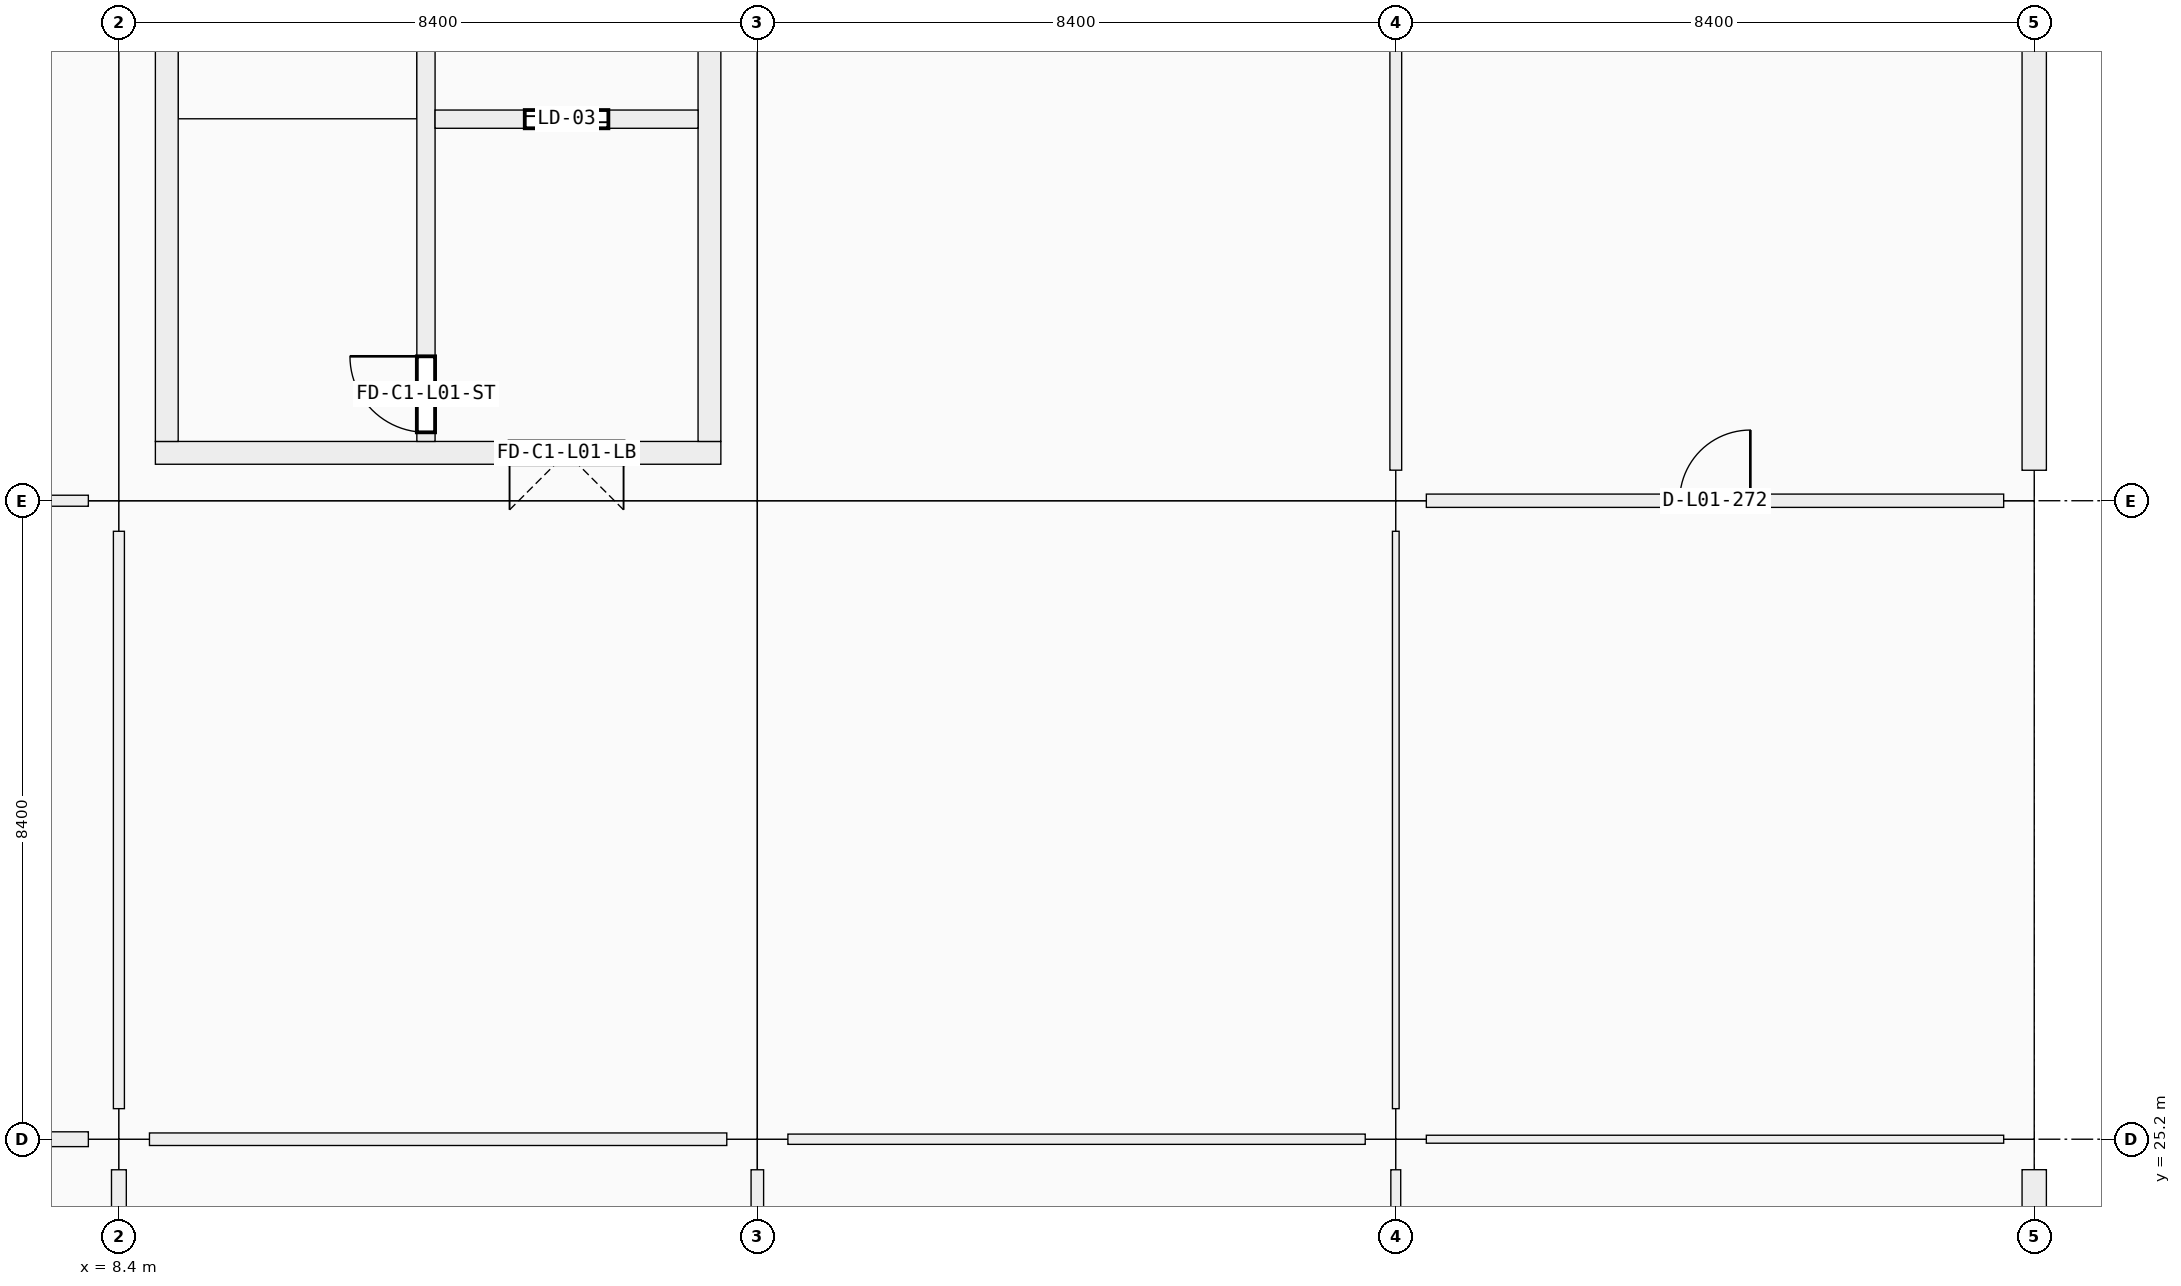
"""IFC4 building model, lengths in metres.
Left out: names, types, materials, properties, quantities, classifications, styles, units other than length and angle.
Written with IfcOpenShell. Run it as: python <this file> out.ifc"""

import sys

from ifc_helpers import new_model, si_unit, direction, frame, frame_2d, origin, origin_2d, place, context, subcontext, project, spatial, rectangle, extrude, element, fill, save


model = new_model("IFC4")
c1 = context("Model", 3, precision=1e-05, world=origin(), true_north=direction((0.0, 1.0)))
c2 = subcontext(c1, "Body", "Model", "MODEL_VIEW")
j1 = project(units=[si_unit("LENGTHUNIT", "METRE"), si_unit("PLANEANGLEUNIT", "RADIAN")], contexts=[c1])
p1 = place(None, origin())
s1 = spatial("IfcSite", under=j1, at=p1, CompositionType="ELEMENT")
p2 = place(p1, origin())
s2 = spatial("IfcBuilding", under=s1, at=p2, CompositionType="ELEMENT")
p3 = place(p2, frame((0.0, 0.0, 5.76)))
s3 = spatial("IfcBuildingStorey", under=s2, at=p3, CompositionType="ELEMENT", Elevation=5.76)
for number, where, z_axis, x_axis in (
    (1, (8.4, 25.2, 0.0), (0.0, 0.0, 1.0), (1.0, 0.0, 0.0)),
    (2, (8.4, 33.6, 0.0), (0.0, 0.0, 1.0), (1.0, 0.0, 0.0)),
    (3, (16.8, 25.2, 0.0), (0.0, 0.0, 1.0), (1.0, 0.0, 0.0)),
    (4, (16.8, 33.6, 0.0), (0.0, 0.0, 1.0), (1.0, 0.0, 0.0)),
    (5, (25.2, 25.2, 0.0), (0.0, 0.0, 1.0), (1.0, 0.0, 0.0)),
    (6, (25.2, 33.6, 0.0), (0.0, 0.0, 1.0), (1.0, 0.0, 0.0)),
    (7, (33.6, 25.2, 0.0), (0.0, 0.0, 1.0), (1.0, 0.0, 0.0)),
    (8, (33.6, 33.6, 0.0), (0.0, 0.0, 1.0), (1.0, 0.0, 0.0)),
):
    element("IfcColumn", number, at=place(p3, frame(where, z_axis=z_axis, x_axis=x_axis)), inside=s3, PredefinedType="COLUMN", context=c2, shape_type="SweptSolid", body=[
        extrude(rectangle(XDim=0.8, YDim=0.8, at=origin_2d()), origin(), (0.0, 0.0, 1.0), 4.5),
    ])
p4 = place(p3, frame((33.6, 24.799, 0.0), z_axis=(0.0, 0.0, 1.0), x_axis=(0.0, -1.0, 0.0)))
e9 = element("IfcWall", 9, at=p4, inside=s3, PredefinedType="SOLIDWALL", context=c2, shape_type="SweptSolid", body=[
    extrude(rectangle(XDim=7.598, YDim=0.32, at=frame_2d((3.799, 0.0))), origin(), (0.0, 0.0, 1.0), 3.4),
])
p5 = place(p4, frame((2.349, 0.0, 0.9)))
e10 = element("IfcOpeningElement", 10, at=p5, cuts=e9, PredefinedType="OPENING", context=c2, shape_type="SweptSolid", body=[
    extrude(rectangle(XDim=2.9, YDim=1.85, at=frame_2d((1.45, 0.925))), frame((0.0, 0.16, 0.0), z_axis=(0.0, -1.0, 0.0), x_axis=(1.0, 0.0, 0.0)), (0.0, 0.0, 1.0), 0.32),
])
p6 = place(p3, frame((33.6, 41.599, 0.0), z_axis=(0.0, 0.0, 1.0), x_axis=(0.0, -1.0, 0.0)))
e11 = element("IfcWall", 11, at=p6, inside=s3, PredefinedType="SOLIDWALL", context=c2, shape_type="SweptSolid", body=[
    extrude(rectangle(XDim=7.598, YDim=0.32, at=frame_2d((3.799, 0.0))), origin(), (0.0, 0.0, 1.0), 3.4),
])
p7 = place(p6, frame((3.074, 0.0, 0.9)))
e12 = element("IfcOpeningElement", 12, at=p7, cuts=e11, PredefinedType="OPENING", context=c2, shape_type="SweptSolid", body=[
    extrude(rectangle(XDim=1.45, YDim=1.85, at=frame_2d((0.725, 0.925))), frame((0.0, 0.16, 0.0), z_axis=(0.0, -1.0, 0.0), x_axis=(1.0, 0.0, 0.0)), (0.0, 0.0, 1.0), 0.32),
])
p8 = place(p3, frame((16.32, 34.23, 0.0), z_axis=(0.0, 0.0, 1.0), x_axis=(-1.0, 0.0, 0.0)))
e13 = element("IfcWall", 13, at=p8, inside=s3, PredefinedType="SHEAR", context=c2, shape_type="SweptSolid", body=[
    extrude(rectangle(XDim=7.44, YDim=0.3, at=frame_2d((3.72, 0.0))), origin(), (0.0, 0.0, 1.0), 4.5),
])
p9 = place(p8, frame((1.28, 0.0, 0.0)))
e14 = element("IfcOpeningElement", 14, at=p9, cuts=e13, PredefinedType="OPENING", context=c2, shape_type="SweptSolid", body=[
    extrude(rectangle(XDim=1.5, YDim=2.15, at=frame_2d((0.75, 1.075))), frame((0.0, 0.15, 0.0), z_axis=(0.0, -1.0, 0.0), x_axis=(1.0, 0.0, 0.0)), (0.0, 0.0, 1.0), 0.3),
])
for number, where, z_axis, x_axis in (
    (15, (9.03, 34.38, 0.0), (0.0, 0.0, 1.0), (0.0, 1.0, 0.0)),
    (16, (16.17, 41.22, 0.0), (0.0, 0.0, 1.0), (0.0, -1.0, 0.0)),
):
    element("IfcWall", number, at=place(p3, frame(where, z_axis=z_axis, x_axis=x_axis)), inside=s3, PredefinedType="SHEAR", context=c2, shape_type="SweptSolid", body=[
        extrude(rectangle(XDim=6.84, YDim=0.3, at=frame_2d((3.42, 0.0))), origin(), (0.0, 0.0, 1.0), 4.5),
    ])
p10 = place(p3, frame((12.44, 34.38, 0.0), z_axis=(0.0, 0.0, 1.0), x_axis=(0.0, 1.0, 0.0)))
e17 = element("IfcWall", 17, at=p10, inside=s3, PredefinedType="SHEAR", context=c2, shape_type="SweptSolid", body=[
    extrude(rectangle(XDim=6.84, YDim=0.24, at=frame_2d((3.42, 0.0))), origin(), (0.0, 0.0, 1.0), 4.5),
])
p11 = place(p10, frame((0.12, 0.0, 0.0)))
e18 = element("IfcOpeningElement", 18, at=p11, cuts=e17, PredefinedType="OPENING", context=c2, shape_type="SweptSolid", body=[
    extrude(rectangle(XDim=1.0, YDim=2.15, at=frame_2d((0.5, 1.075))), frame((0.0, 0.12, 0.0), z_axis=(0.0, -1.0, 0.0), x_axis=(1.0, 0.0, 0.0)), (0.0, 0.0, 1.0), 0.24),
])
p12 = place(p3, frame((12.56, 38.62, 0.0), z_axis=(0.0, 0.0, 1.0), x_axis=(1.0, 0.0, 0.0)))
e19 = element("IfcWall", 19, at=p12, inside=s3, PredefinedType="SHEAR", context=c2, shape_type="SweptSolid", body=[
    extrude(rectangle(XDim=3.46, YDim=0.24, at=frame_2d((1.73, 0.0))), origin(), (0.0, 0.0, 1.0), 4.5),
])
p13 = place(p12, frame((1.18, 0.0, 0.0)))
e20 = element("IfcOpeningElement", 20, at=p13, cuts=e19, PredefinedType="OPENING", context=c2, shape_type="SweptSolid", body=[
    extrude(rectangle(XDim=1.1, YDim=2.15, at=frame_2d((0.55, 1.075))), frame((0.0, 0.12, 0.0), z_axis=(0.0, -1.0, 0.0), x_axis=(1.0, 0.0, 0.0)), (0.0, 0.0, 1.0), 0.24),
])
p14 = place(p3, frame((0.277, 25.2, 0.0), z_axis=(0.0, 0.0, 1.0), x_axis=(1.0, 0.0, 0.0)))
e21 = element("IfcWall", 21, at=p14, inside=s3, PredefinedType="PARTITIONING", context=c2, shape_type="SweptSolid", body=[
    extrude(rectangle(XDim=7.721, YDim=0.195, at=frame_2d((3.86, 0.0))), origin(), (0.0, 0.0, 1.0), 2.4),
])
p15 = place(p14, frame((3.396, 0.0, 0.0)))
e22 = element("IfcOpeningElement", 22, at=p15, cuts=e21, PredefinedType="OPENING", context=c2, shape_type="SweptSolid", body=[
    extrude(rectangle(XDim=0.93, YDim=2.12, at=frame_2d((0.465, 1.06))), frame((0.0, 0.098, 0.0), z_axis=(0.0, -1.0, 0.0), x_axis=(1.0, 0.0, 0.0)), (0.0, 0.0, 1.0), 0.195),
])
p16 = place(p3, frame((0.277, 33.6, 0.0), z_axis=(0.0, 0.0, 1.0), x_axis=(1.0, 0.0, 0.0)))
e23 = element("IfcWall", 23, at=p16, inside=s3, PredefinedType="PARTITIONING", context=c2, shape_type="SweptSolid", body=[
    extrude(rectangle(XDim=7.721, YDim=0.145, at=frame_2d((3.86, 0.0))), origin(), (0.0, 0.0, 1.0), 2.4),
])
p17 = place(p16, frame((3.341, 0.0, 0.0)))
e24 = element("IfcOpeningElement", 24, at=p17, cuts=e23, PredefinedType="OPENING", context=c2, shape_type="SweptSolid", body=[
    extrude(rectangle(XDim=1.04, YDim=2.2, at=frame_2d((0.52, 1.1))), frame((0.0, 0.073, 0.0), z_axis=(0.0, -1.0, 0.0), x_axis=(1.0, 0.0, 0.0)), (0.0, 0.0, 1.0), 0.145),
])
p18 = place(p3, frame((8.802, 25.2, 0.0), z_axis=(0.0, 0.0, 1.0), x_axis=(1.0, 0.0, 0.0)))
e25 = element("IfcWall", 25, at=p18, inside=s3, PredefinedType="PARTITIONING", context=c2, shape_type="SweptSolid", body=[
    extrude(rectangle(XDim=7.596, YDim=0.165, at=frame_2d((3.798, 0.0))), origin(), (0.0, 0.0, 1.0), 2.4),
])
p19 = place(p18, frame((3.318, 0.0, 0.0)))
e26 = element("IfcOpeningElement", 26, at=p19, cuts=e25, PredefinedType="OPENING", context=c2, shape_type="SweptSolid", body=[
    extrude(rectangle(XDim=0.96, YDim=2.18, at=frame_2d((0.48, 1.09))), frame((0.0, 0.083, 0.0), z_axis=(0.0, -1.0, 0.0), x_axis=(1.0, 0.0, 0.0)), (0.0, 0.0, 1.0), 0.165),
])
p20 = place(p3, frame((17.202, 25.2, 0.0), z_axis=(0.0, 0.0, 1.0), x_axis=(1.0, 0.0, 0.0)))
e27 = element("IfcWall", 27, at=p20, inside=s3, PredefinedType="PARTITIONING", context=c2, shape_type="SweptSolid", body=[
    extrude(rectangle(XDim=7.596, YDim=0.135, at=frame_2d((3.798, 0.0))), origin(), (0.0, 0.0, 1.0), 2.4),
])
p21 = place(p20, frame((3.338, 0.0, 0.0)))
e28 = element("IfcOpeningElement", 28, at=p21, cuts=e27, PredefinedType="OPENING", context=c2, shape_type="SweptSolid", body=[
    extrude(rectangle(XDim=0.92, YDim=2.15, at=frame_2d((0.46, 1.075))), frame((0.0, 0.067, 0.0), z_axis=(0.0, -1.0, 0.0), x_axis=(1.0, 0.0, 0.0)), (0.0, 0.0, 1.0), 0.135),
])
p22 = place(p3, frame((25.602, 25.2, 0.0), z_axis=(0.0, 0.0, 1.0), x_axis=(1.0, 0.0, 0.0)))
e29 = element("IfcWall", 29, at=p22, inside=s3, PredefinedType="PARTITIONING", context=c2, shape_type="SweptSolid", body=[
    extrude(rectangle(XDim=7.596, YDim=0.105, at=frame_2d((3.798, 0.0))), origin(), (0.0, 0.0, 1.0), 2.4),
])
p23 = place(p22, frame((3.278, 0.0, 0.0)))
e30 = element("IfcOpeningElement", 30, at=p23, cuts=e29, PredefinedType="OPENING", context=c2, shape_type="SweptSolid", body=[
    extrude(rectangle(XDim=1.04, YDim=2.2, at=frame_2d((0.52, 1.1))), frame((0.0, 0.052, 0.0), z_axis=(0.0, -1.0, 0.0), x_axis=(1.0, 0.0, 0.0)), (0.0, 0.0, 1.0), 0.105),
])
p24 = place(p3, frame((25.602, 33.6, 0.0), z_axis=(0.0, 0.0, 1.0), x_axis=(1.0, 0.0, 0.0)))
e31 = element("IfcWall", 31, at=p24, inside=s3, PredefinedType="PARTITIONING", context=c2, shape_type="SweptSolid", body=[
    extrude(rectangle(XDim=7.596, YDim=0.175, at=frame_2d((3.798, 0.0))), origin(), (0.0, 0.0, 1.0), 2.4),
])
p25 = place(p24, frame((3.333, 0.0, 0.0)))
e32 = element("IfcOpeningElement", 32, at=p25, cuts=e31, PredefinedType="OPENING", context=c2, shape_type="SweptSolid", body=[
    extrude(rectangle(XDim=0.93, YDim=2.12, at=frame_2d((0.465, 1.06))), frame((0.0, 0.087, 0.0), z_axis=(0.0, -1.0, 0.0), x_axis=(1.0, 0.0, 0.0)), (0.0, 0.0, 1.0), 0.175),
])
p26 = place(p3, frame((8.4, 17.202, 0.0), z_axis=(0.0, 0.0, 1.0), x_axis=(0.0, 1.0, 0.0)))
e33 = element("IfcWall", 33, at=p26, inside=s3, PredefinedType="PARTITIONING", context=c2, shape_type="SweptSolid", body=[
    extrude(rectangle(XDim=7.596, YDim=0.195, at=frame_2d((3.798, 0.0))), origin(), (0.0, 0.0, 1.0), 2.4),
])
p27 = place(p26, frame((3.308, 0.0, 0.0)))
e34 = element("IfcOpeningElement", 34, at=p27, cuts=e33, PredefinedType="OPENING", context=c2, shape_type="SweptSolid", body=[
    extrude(rectangle(XDim=0.98, YDim=2.18, at=frame_2d((0.49, 1.09))), frame((0.0, 0.098, 0.0), z_axis=(0.0, -1.0, 0.0), x_axis=(1.0, 0.0, 0.0)), (0.0, 0.0, 1.0), 0.195),
])
p28 = place(p3, frame((8.4, 25.602, 0.0), z_axis=(0.0, 0.0, 1.0), x_axis=(0.0, 1.0, 0.0)))
e35 = element("IfcWall", 35, at=p28, inside=s3, PredefinedType="PARTITIONING", context=c2, shape_type="SweptSolid", body=[
    extrude(rectangle(XDim=7.596, YDim=0.145, at=frame_2d((3.798, 0.0))), origin(), (0.0, 0.0, 1.0), 2.4),
])
p29 = place(p28, frame((3.313, 0.0, 0.0)))
e36 = element("IfcOpeningElement", 36, at=p29, cuts=e35, PredefinedType="OPENING", context=c2, shape_type="SweptSolid", body=[
    extrude(rectangle(XDim=0.97, YDim=2.12, at=frame_2d((0.485, 1.06))), frame((0.0, 0.073, 0.0), z_axis=(0.0, -1.0, 0.0), x_axis=(1.0, 0.0, 0.0)), (0.0, 0.0, 1.0), 0.145),
])
p30 = place(p3, frame((16.8, 17.202, 0.0), z_axis=(0.0, 0.0, 1.0), x_axis=(0.0, 1.0, 0.0)))
e37 = element("IfcWall", 37, at=p30, inside=s3, PredefinedType="PARTITIONING", context=c2, shape_type="SweptSolid", body=[
    extrude(rectangle(XDim=7.596, YDim=0.165, at=frame_2d((3.798, 0.0))), origin(), (0.0, 0.0, 1.0), 2.4),
])
p31 = place(p30, frame((3.293, 0.0, 0.0)))
e38 = element("IfcOpeningElement", 38, at=p31, cuts=e37, PredefinedType="OPENING", context=c2, shape_type="SweptSolid", body=[
    extrude(rectangle(XDim=1.01, YDim=2.12, at=frame_2d((0.505, 1.06))), frame((0.0, 0.083, 0.0), z_axis=(0.0, -1.0, 0.0), x_axis=(1.0, 0.0, 0.0)), (0.0, 0.0, 1.0), 0.165),
])
p32 = place(p3, frame((25.2, 17.202, 0.0), z_axis=(0.0, 0.0, 1.0), x_axis=(0.0, 1.0, 0.0)))
e39 = element("IfcWall", 39, at=p32, inside=s3, PredefinedType="MOVABLE", context=c2, shape_type="SweptSolid", body=[
    extrude(rectangle(XDim=7.596, YDim=0.13, at=frame_2d((3.798, 0.0))), origin(), (0.0, 0.0, 1.0), 2.4),
])
p33 = place(p32, frame((3.278, 0.0, 0.0)))
e40 = element("IfcOpeningElement", 40, at=p33, cuts=e39, PredefinedType="OPENING", context=c2, shape_type="SweptSolid", body=[
    extrude(rectangle(XDim=1.04, YDim=2.2, at=frame_2d((0.52, 1.1))), frame((0.0, 0.065, 0.0), z_axis=(0.0, -1.0, 0.0), x_axis=(1.0, 0.0, 0.0)), (0.0, 0.0, 1.0), 0.13),
])
p34 = place(p3, frame((25.2, 25.602, 0.0), z_axis=(0.0, 0.0, 1.0), x_axis=(0.0, 1.0, 0.0)))
e41 = element("IfcWall", 41, at=p34, inside=s3, PredefinedType="PARTITIONING", context=c2, shape_type="SweptSolid", body=[
    extrude(rectangle(XDim=7.596, YDim=0.088, at=frame_2d((3.798, 0.0))), origin(), (0.0, 0.0, 1.0), 2.4),
])
p35 = place(p34, frame((3.268, 0.0, 0.0)))
e42 = element("IfcOpeningElement", 42, at=p35, cuts=e41, PredefinedType="OPENING", context=c2, shape_type="SweptSolid", body=[
    extrude(rectangle(XDim=1.06, YDim=2.22, at=frame_2d((0.53, 1.11))), frame((0.0, 0.044, 0.0), z_axis=(0.0, -1.0, 0.0), x_axis=(1.0, 0.0, 0.0)), (0.0, 0.0, 1.0), 0.088),
])
p36 = place(p3, frame((25.2, 34.002, 0.0), z_axis=(0.0, 0.0, 1.0), x_axis=(0.0, 1.0, 0.0)))
e43 = element("IfcWall", 43, at=p36, inside=s3, PredefinedType="PARTITIONING", context=c2, shape_type="SweptSolid", body=[
    extrude(rectangle(XDim=7.596, YDim=0.155, at=frame_2d((3.798, 0.0))), origin(), (0.0, 0.0, 1.0), 2.4),
])
p37 = place(p36, frame((3.278, 0.0, 0.0)))
e44 = element("IfcOpeningElement", 44, at=p37, cuts=e43, PredefinedType="OPENING", context=c2, shape_type="SweptSolid", body=[
    extrude(rectangle(XDim=1.04, YDim=2.2, at=frame_2d((0.52, 1.1))), frame((0.0, 0.078, 0.0), z_axis=(0.0, -1.0, 0.0), x_axis=(1.0, 0.0, 0.0)), (0.0, 0.0, 1.0), 0.155),
])
p38 = place(p7, origin())
e45 = element("IfcWindow", 45, at=p38, inside=s3, PartitioningType="SINGLE_PANEL", PredefinedType="WINDOW", context=c2, shape_type="SweptSolid", body=[
    extrude(rectangle(XDim=1.45, YDim=1.85, at=frame_2d((0.725, 0.925))), frame((0.0, 0.03, 0.0), z_axis=(0.0, -1.0, 0.0), x_axis=(1.0, 0.0, 0.0)), (0.0, 0.0, 1.0), 0.06),
])
fill(e12, e45)
p39 = place(p11, origin())
e46 = element("IfcDoor", 46, at=p39, inside=s3, OperationType="SINGLE_SWING_RIGHT", PredefinedType="DOOR", context=c2, shape_type="SweptSolid", body=[
    extrude(rectangle(XDim=1.0, YDim=2.15, at=frame_2d((0.5, 1.075))), frame((0.0, 0.025, 0.0), z_axis=(0.0, -1.0, 0.0), x_axis=(1.0, 0.0, 0.0)), (0.0, 0.0, 1.0), 0.05),
])
fill(e18, e46)
p40 = place(p9, origin())
e47 = element("IfcDoor", 47, at=p40, inside=s3, OperationType="DOUBLE_DOOR_SINGLE_SWING", PredefinedType="DOOR", context=c2, shape_type="SweptSolid", body=[
    extrude(rectangle(XDim=1.5, YDim=2.15, at=frame_2d((0.75, 1.075))), frame((0.0, 0.025, 0.0), z_axis=(0.0, -1.0, 0.0), x_axis=(1.0, 0.0, 0.0)), (0.0, 0.0, 1.0), 0.05),
])
fill(e14, e47)
p41 = place(p13, origin())
e48 = element("IfcDoor", 48, at=p41, inside=s3, OperationType="DOUBLE_DOOR_SLIDING", PredefinedType="DOOR", context=c2, shape_type="SweptSolid", body=[
    extrude(rectangle(XDim=1.1, YDim=2.15, at=frame_2d((0.55, 1.075))), frame((0.0, 0.025, 0.0), z_axis=(0.0, -1.0, 0.0), x_axis=(1.0, 0.0, 0.0)), (0.0, 0.0, 1.0), 0.05),
])
fill(e20, e48)
p42 = place(p19, origin())
e49 = element("IfcDoor", 49, at=p42, inside=s3, OperationType="SINGLE_SWING_RIGHT", PredefinedType="DOOR", context=c2, shape_type="SweptSolid", body=[
    extrude(rectangle(XDim=0.96, YDim=2.18, at=frame_2d((0.48, 1.09))), frame((0.0, 0.025, 0.0), z_axis=(0.0, -1.0, 0.0), x_axis=(1.0, 0.0, 0.0)), (0.0, 0.0, 1.0), 0.05),
])
fill(e26, e49)
p43 = place(p21, origin())
e50 = element("IfcDoor", 50, at=p43, inside=s3, OperationType="SINGLE_SWING_RIGHT", PredefinedType="DOOR", context=c2, shape_type="SweptSolid", body=[
    extrude(rectangle(XDim=0.92, YDim=2.15, at=frame_2d((0.46, 1.075))), frame((0.0, 0.025, 0.0), z_axis=(0.0, -1.0, 0.0), x_axis=(1.0, 0.0, 0.0)), (0.0, 0.0, 1.0), 0.05),
])
fill(e28, e50)
p44 = place(p29, origin())
e51 = element("IfcDoor", 51, at=p44, inside=s3, OperationType="SINGLE_SWING_RIGHT", PredefinedType="DOOR", context=c2, shape_type="SweptSolid", body=[
    extrude(rectangle(XDim=0.97, YDim=2.12, at=frame_2d((0.485, 1.06))), frame((0.0, 0.025, 0.0), z_axis=(0.0, -1.0, 0.0), x_axis=(1.0, 0.0, 0.0)), (0.0, 0.0, 1.0), 0.05),
])
fill(e36, e51)
p45 = place(p35, origin())
e52 = element("IfcDoor", 52, at=p45, inside=s3, OperationType="SINGLE_SWING_LEFT", PredefinedType="DOOR", context=c2, shape_type="SweptSolid", body=[
    extrude(rectangle(XDim=1.06, YDim=2.22, at=frame_2d((0.53, 1.11))), frame((0.0, 0.025, 0.0), z_axis=(0.0, -1.0, 0.0), x_axis=(1.0, 0.0, 0.0)), (0.0, 0.0, 1.0), 0.05),
])
fill(e42, e52)
p46 = place(p37, origin())
e53 = element("IfcDoor", 53, at=p46, inside=s3, OperationType="SINGLE_SWING_RIGHT", PredefinedType="DOOR", context=c2, shape_type="SweptSolid", body=[
    extrude(rectangle(XDim=1.04, YDim=2.2, at=frame_2d((0.52, 1.1))), frame((0.0, 0.025, 0.0), z_axis=(0.0, -1.0, 0.0), x_axis=(1.0, 0.0, 0.0)), (0.0, 0.0, 1.0), 0.05),
])
fill(e44, e53)
p47 = place(p23, origin())
e54 = element("IfcDoor", 54, at=p47, inside=s3, OperationType="SINGLE_SWING_RIGHT", PredefinedType="DOOR", context=c2, shape_type="SweptSolid", body=[
    extrude(rectangle(XDim=1.04, YDim=2.2, at=frame_2d((0.52, 1.1))), frame((0.0, 0.025, 0.0), z_axis=(0.0, -1.0, 0.0), x_axis=(1.0, 0.0, 0.0)), (0.0, 0.0, 1.0), 0.05),
])
fill(e30, e54)
p48 = place(p25, origin())
e55 = element("IfcDoor", 55, at=p48, inside=s3, OperationType="SINGLE_SWING_RIGHT", PredefinedType="DOOR", context=c2, shape_type="SweptSolid", body=[
    extrude(rectangle(XDim=0.93, YDim=2.12, at=frame_2d((0.465, 1.06))), frame((0.0, 0.025, 0.0), z_axis=(0.0, -1.0, 0.0), x_axis=(1.0, 0.0, 0.0)), (0.0, 0.0, 1.0), 0.05),
])
fill(e32, e55)
save(model, sys.argv[1])
